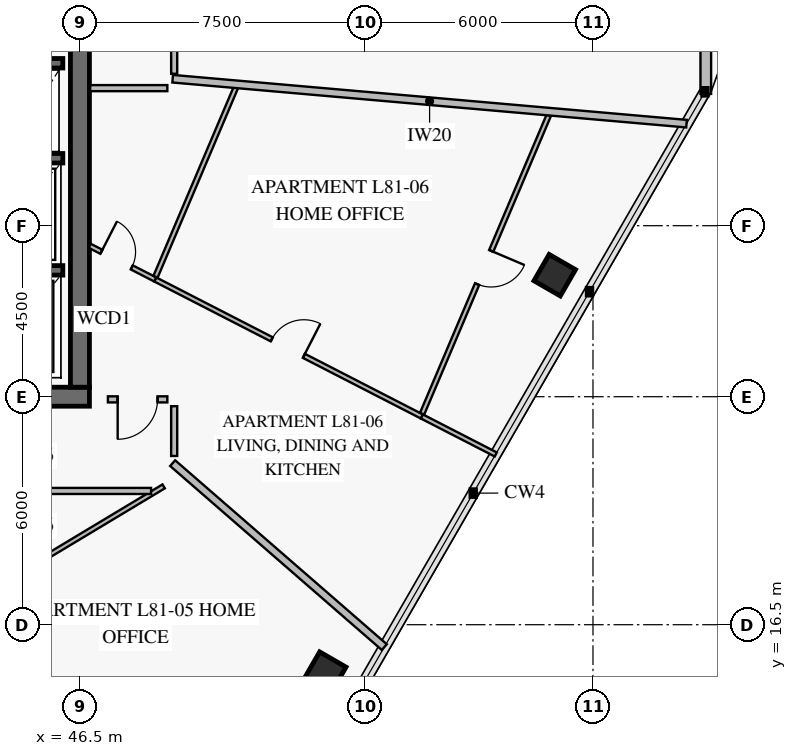
"""IFC4 building model, lengths in metres.
Left out: names, types, materials, properties, quantities, classifications, styles, units other than length and angle.
Written with IfcOpenShell. Run it as: python <this file> out.ifc"""

import sys

from ifc_helpers import new_model, si_unit, direction, frame, frame_2d, origin, origin_2d, place, context, subcontext, project, spatial, rectangle, extrude, element, fill, save


model = new_model("IFC4")
c1 = context("Model", 3, precision=1e-05, world=origin(), true_north=direction((0.0, 1.0)))
c2 = subcontext(c1, "Body", "Model", "MODEL_VIEW")
j1 = project(units=[si_unit("LENGTHUNIT", "METRE"), si_unit("PLANEANGLEUNIT", "RADIAN")], contexts=[c1])
p1 = place(None, origin())
s1 = spatial("IfcSite", under=j1, at=p1, CompositionType="ELEMENT")
p2 = place(p1, origin())
s2 = spatial("IfcBuilding", under=s1, at=p2, CompositionType="ELEMENT")
p3 = place(p2, frame((0.0, 0.0, 319.6)))
s3 = spatial("IfcBuildingStorey", under=s2, at=p3, CompositionType="ELEMENT", Elevation=319.6)
p4 = place(p3, frame((37.35, 22.5, 0.0), z_axis=(0.0, 0.0, 1.0), x_axis=(1.0, 0.0, 0.0)))
e1 = element("IfcWall", 1, at=p4, inside=s3, PredefinedType="SHEAR", context=c2, shape_type="SweptSolid", body=[
    extrude(rectangle(XDim=9.4, YDim=0.5, at=frame_2d((4.7, 0.0))), origin(), (0.0, 0.0, 1.0), 3.8),
])
p5 = place(p4, frame((3.95, 0.0, 0.0)))
e2 = element("IfcOpeningElement", 2, at=p5, cuts=e1, PredefinedType="OPENING", context=c2, shape_type="SweptSolid", body=[
    extrude(rectangle(XDim=1.5, YDim=2.15, at=frame_2d((0.75, 1.075))), frame((0.0, 0.262, 0.0), z_axis=(0.0, -1.0, 0.0), x_axis=(1.0, 0.0, 0.0)), (0.0, 0.0, 1.0), 0.524),
])
p6 = place(p3, frame((46.5, 22.75, 0.0), z_axis=(0.0, 0.0, 1.0), x_axis=(0.0, 1.0, 0.0)))
e3 = element("IfcWall", 3, at=p6, inside=s3, PredefinedType="SHEAR", context=c2, shape_type="SweptSolid", body=[
    extrude(rectangle(XDim=18.5, YDim=0.5, at=frame_2d((9.25, 0.0))), origin(), (0.0, 0.0, 1.0), 3.8),
])
p7 = place(p6, frame((9.0, 0.0, 0.0)))
e4 = element("IfcOpeningElement", 4, at=p7, cuts=e3, PredefinedType="OPENING", context=c2, shape_type="SweptSolid", body=[
    extrude(rectangle(XDim=1.1, YDim=2.15, at=frame_2d((0.55, 1.075))), frame((0.0, 0.262, 0.0), z_axis=(0.0, -1.0, 0.0), x_axis=(1.0, 0.0, 0.0)), (0.0, 0.0, 1.0), 0.524),
])
for number, where, z_axis, x_axis in (
    (5, (52.955, 15.238, 0.0), (0.0, 0.0, 1.0), (0.5, 0.866, 0.0)),
    (6, (58.993, 25.698, 0.0), (0.0, 0.0, 1.0), (0.5, 0.866, 0.0)),
):
    element("IfcColumn", number, at=place(p3, frame(where, z_axis=z_axis, x_axis=x_axis)), inside=s3, PredefinedType="COLUMN", context=c2, shape_type="SweptSolid", body=[
        extrude(rectangle(XDim=0.8, YDim=0.8, at=origin_2d()), origin(), (0.0, 0.0, 1.0), 3.55),
    ])
p8 = place(p3, frame((62.969, 33.532, 0.0), z_axis=(0.0, 0.0, 1.0), x_axis=(0.0, -1.0, 0.0)))
e7 = element("IfcWall", 7, at=p8, inside=s3, PredefinedType="SOLIDWALL", context=c2, shape_type="SweptSolid", body=[
    extrude(rectangle(XDim=3.065, YDim=0.28, at=frame_2d((1.532, 0.0))), origin(), (0.0, 0.0, 1.0), 3.55),
])
p9 = place(p3, frame((25.95, 31.275, 0.0), z_axis=(0.0, 0.0, 1.0), x_axis=(1.0, 0.0, 0.0)))
e8 = element("IfcWall", 8, at=p9, inside=s3, PredefinedType="SOLIDWALL", context=c2, shape_type="SweptSolid", body=[
    extrude(rectangle(XDim=20.1, YDim=0.25, at=frame_2d((10.05, 0.0))), origin(), (0.0, 0.0, 1.0), 3.8),
])
p10 = place(p9, frame((2.6, 0.0, 0.0)))
e9 = element("IfcOpeningElement", 9, at=p10, cuts=e8, PredefinedType="OPENING", context=c2, shape_type="SweptSolid", body=[
    extrude(rectangle(XDim=1.1, YDim=2.15, at=frame_2d((0.55, 1.075))), frame((0.0, 0.137, 0.0), z_axis=(0.0, -1.0, 0.0), x_axis=(1.0, 0.0, 0.0)), (0.0, 0.0, 1.0), 0.274),
])
p11 = place(p9, frame((10.6, 0.0, 0.0)))
e10 = element("IfcOpeningElement", 10, at=p11, cuts=e8, PredefinedType="OPENING", context=c2, shape_type="SweptSolid", body=[
    extrude(rectangle(XDim=1.1, YDim=2.15, at=frame_2d((0.55, 1.075))), frame((0.0, 0.137, 0.0), z_axis=(0.0, -1.0, 0.0), x_axis=(1.0, 0.0, 0.0)), (0.0, 0.0, 1.0), 0.274),
])
p12 = place(p9, frame((16.35, 0.0, 0.0)))
e11 = element("IfcOpeningElement", 11, at=p12, cuts=e8, PredefinedType="OPENING", context=c2, shape_type="SweptSolid", body=[
    extrude(rectangle(XDim=1.1, YDim=2.15, at=frame_2d((0.55, 1.075))), frame((0.0, 0.137, 0.0), z_axis=(0.0, -1.0, 0.0), x_axis=(1.0, 0.0, 0.0)), (0.0, 0.0, 1.0), 0.274),
])
for number, where, z_axis, x_axis in (
    (12, (43.8, 25.825, 0.0), (0.0, 0.0, 1.0), (1.0, 0.0, 0.0)),
    (13, (43.8, 28.775, 0.0), (0.0, 0.0, 1.0), (1.0, 0.0, 0.0)),
):
    element("IfcWall", number, at=place(p3, frame(where, z_axis=z_axis, x_axis=x_axis)), inside=s3, PredefinedType="SOLIDWALL", context=c2, shape_type="SweptSolid", body=[
        extrude(rectangle(XDim=2.25, YDim=0.25, at=frame_2d((1.125, 0.0))), origin(), (0.0, 0.0, 1.0), 3.8),
    ])
p13 = place(p3, frame((43.565, 17.023, 0.0), z_axis=(0.0, 0.0, 1.0), x_axis=(0.450887042269, -0.892581018796, 0.0)))
e14 = element("IfcWall", 14, at=p13, inside=s3, PredefinedType="PARTITIONING", context=c2, shape_type="SweptSolid", body=[
    extrude(rectangle(XDim=7.436, YDim=0.12, at=frame_2d((3.718, 0.0))), origin(), (0.0, 0.0, 1.0), 2.97),
])
p14 = place(p13, frame((3.218, 0.0, 0.0)))
e15 = element("IfcOpeningElement", 15, at=p14, cuts=e14, PredefinedType="OPENING", context=c2, shape_type="SweptSolid", body=[
    extrude(rectangle(XDim=0.95, YDim=2.1, at=frame_2d((0.475, 1.05))), frame((0.0, 0.072, 0.0), z_axis=(0.0, -1.0, 0.0), x_axis=(1.0, 0.0, 0.0)), (0.0, 0.0, 1.0), 0.144),
])
p15 = place(p3, frame((46.758, 26.471, 0.0), z_axis=(0.0, 0.0, 1.0), x_axis=(0.889392970677, -0.457143460755, 0.0)))
e16 = element("IfcWall", 16, at=p15, inside=s3, PredefinedType="PARTITIONING", context=c2, shape_type="SweptSolid", body=[
    extrude(rectangle(XDim=1.942, YDim=0.12, at=frame_2d((0.971, 0.0))), origin(), (0.0, 0.0, 1.0), 3.55),
])
p16 = place(p15, frame((0.344, 0.0, 0.0)))
e17 = element("IfcOpeningElement", 17, at=p16, cuts=e16, PredefinedType="OPENING", context=c2, shape_type="SweptSolid", body=[
    extrude(rectangle(XDim=0.9, YDim=2.1, at=frame_2d((0.45, 1.05))), frame((0.0, 0.072, 0.0), z_axis=(0.0, -1.0, 0.0), x_axis=(1.0, 0.0, 0.0)), (0.0, 0.0, 1.0), 0.144),
])
p17 = place(p3, frame((48.485, 25.583, 0.0), z_axis=(0.0, 0.0, 1.0), x_axis=(0.889425539597, -0.457080090917, 0.0)))
e18 = element("IfcWall", 18, at=p17, inside=s3, PredefinedType="PARTITIONING", context=c2, shape_type="SweptSolid", body=[
    extrude(rectangle(XDim=7.886, YDim=0.12, at=frame_2d((3.943, 0.0))), origin(), (0.0, 0.0, 1.0), 3.2),
])
p18 = place(p17, frame((3.443, 0.0, 0.0)))
e19 = element("IfcOpeningElement", 19, at=p18, cuts=e18, PredefinedType="OPENING", context=c2, shape_type="SweptSolid", body=[
    extrude(rectangle(XDim=0.95, YDim=2.1, at=frame_2d((0.475, 1.05))), frame((0.0, 0.072, 0.0), z_axis=(0.0, -1.0, 0.0), x_axis=(1.0, 0.0, 0.0)), (0.0, 0.0, 1.0), 0.144),
])
p19 = place(p3, frame((55.504, 22.053, 0.0), z_axis=(0.0, 0.0, 1.0), x_axis=(0.390730730801, 0.920505022261, 0.0)))
e20 = element("IfcWall", 20, at=p19, inside=s3, PredefinedType="PARTITIONING", context=c2, shape_type="SweptSolid", body=[
    extrude(rectangle(XDim=8.526, YDim=0.12, at=frame_2d((4.263, 0.0))), origin(), (0.0, 0.0, 1.0), 3.0),
])
p20 = place(p19, frame((3.704, 0.0, 0.0)))
e21 = element("IfcOpeningElement", 21, at=p20, cuts=e20, PredefinedType="OPENING", context=c2, shape_type="SweptSolid", body=[
    extrude(rectangle(XDim=0.95, YDim=2.1, at=frame_2d((0.475, 1.05))), frame((0.0, 0.072, 0.0), z_axis=(0.0, -1.0, 0.0), x_axis=(1.0, 0.0, 0.0)), (0.0, 0.0, 1.0), 0.144),
])
p21 = place(p3, frame((48.8, 22.43, 0.0), z_axis=(0.0, 0.0, 1.0), x_axis=(-1.0, 0.0, 0.0)))
e22 = element("IfcWall", 22, at=p21, inside=s3, PredefinedType="PARTITIONING", context=c2, shape_type="SweptSolid", body=[
    extrude(rectangle(XDim=1.564, YDim=0.16, at=frame_2d((0.782, 0.0))), origin(), (0.0, 0.0, 1.0), 3.55),
])
p22 = place(p21, frame((0.257, 0.0, 0.0)))
e23 = element("IfcOpeningElement", 23, at=p22, cuts=e22, PredefinedType="OPENING", context=c2, shape_type="SweptSolid", body=[
    extrude(rectangle(XDim=1.05, YDim=2.15, at=frame_2d((0.525, 1.075))), frame((0.0, 0.092, 0.0), z_axis=(0.0, -1.0, 0.0), x_axis=(1.0, 0.0, 0.0)), (0.0, 0.0, 1.0), 0.184),
])
p23 = place(p3, frame((48.98, 30.999, 0.0), z_axis=(0.0, 0.0, 1.0), x_axis=(0.0, 1.0, 0.0)))
e24 = element("IfcWall", 24, at=p23, inside=s3, PredefinedType="PARTITIONING", context=c2, shape_type="SweptSolid", body=[
    extrude(rectangle(XDim=3.163, YDim=0.16, at=frame_2d((1.581, 0.0))), origin(), (0.0, 0.0, 1.0), 3.55),
])
p24 = place(p23, frame((1.056, 0.0, 0.0)))
e25 = element("IfcOpeningElement", 25, at=p24, cuts=e24, PredefinedType="OPENING", context=c2, shape_type="SweptSolid", body=[
    extrude(rectangle(XDim=1.05, YDim=2.15, at=frame_2d((0.525, 1.075))), frame((0.0, 0.092, 0.0), z_axis=(0.0, -1.0, 0.0), x_axis=(1.0, 0.0, 0.0)), (0.0, 0.0, 1.0), 0.184),
])
p25 = place(p3, frame((43.612, 17.081, 0.0), z_axis=(0.0, 0.0, 1.0), x_axis=(0.857173603687, 0.515027584837, 0.0)))
e26 = element("IfcWall", 26, at=p25, inside=s3, PredefinedType="PARTITIONING", context=c2, shape_type="SweptSolid", body=[
    extrude(rectangle(XDim=5.94, YDim=0.12, at=frame_2d((2.97, 0.0))), origin(), (0.0, 0.0, 1.0), 3.0),
])
p26 = place(p3, frame((48.94, 20.751, 0.0), z_axis=(0.0, 0.0, 1.0), x_axis=(0.754714491072, -0.656053379662, 0.0)))
e27 = element("IfcWall", 27, at=p26, inside=s3, PredefinedType="PARTITIONING", context=c2, shape_type="SweptSolid", body=[
    extrude(rectangle(XDim=7.379, YDim=0.2, at=frame_2d((3.689, 0.0))), origin(), (0.0, 0.0, 1.0), 2.97),
])
p27 = place(p3, frame((55.5, 21.979, 0.0), z_axis=(0.0, 0.0, 1.0), x_axis=(0.889363131607, -0.457201509335, 0.0)))
e28 = element("IfcWall", 28, at=p27, inside=s3, PredefinedType="PARTITIONING", context=c2, shape_type="SweptSolid", body=[
    extrude(rectangle(XDim=2.184, YDim=0.12, at=frame_2d((1.092, 0.0))), origin(), (0.0, 0.0, 1.0), 2.97),
])
p28 = place(p3, frame((48.49, 25.658, 0.0), z_axis=(0.0, 0.0, 1.0), x_axis=(0.390765351484, 0.920490325902, 0.0)))
e29 = element("IfcWall", 29, at=p28, inside=s3, PredefinedType="PARTITIONING", context=c2, shape_type="SweptSolid", body=[
    extrude(rectangle(XDim=5.469, YDim=0.12, at=frame_2d((2.735, 0.0))), origin(), (0.0, 0.0, 1.0), 3.0),
])
p29 = place(p3, frame((48.94, 30.868, 0.0), z_axis=(0.0, 0.0, 1.0), x_axis=(0.996194010343, -0.087163603397, 0.0)))
e30 = element("IfcWall", 30, at=p29, inside=s3, PredefinedType="PARTITIONING", context=c2, shape_type="SweptSolid", body=[
    extrude(rectangle(XDim=13.573, YDim=0.2, at=frame_2d((6.787, 0.0))), origin(), (0.0, 0.0, 1.0), 2.97),
])
p30 = place(p3, frame((42.128, 20.02, 0.0), z_axis=(0.0, 0.0, 1.0), x_axis=(1.0, 0.0, 0.0)))
e31 = element("IfcWall", 31, at=p30, inside=s3, PredefinedType="PARTITIONING", context=c2, shape_type="SweptSolid", body=[
    extrude(rectangle(XDim=6.244, YDim=0.16, at=frame_2d((3.122, 0.0))), origin(), (0.0, 0.0, 1.0), 3.0),
])
p31 = place(p3, frame((48.98, 20.94, 0.0), z_axis=(0.0, 0.0, 1.0), x_axis=(0.0, 1.0, 0.0)))
e32 = element("IfcWall", 32, at=p31, inside=s3, PredefinedType="PARTITIONING", context=c2, shape_type="SweptSolid", body=[
    extrude(rectangle(XDim=1.31, YDim=0.16, at=frame_2d((0.655, 0.0))), origin(), (0.0, 0.0, 1.0), 3.55),
])
p32 = place(p3, frame((46.77, 30.62, 0.0), z_axis=(0.0, 0.0, 1.0), x_axis=(1.0, 0.0, 0.0)))
e33 = element("IfcWall", 33, at=p32, inside=s3, PredefinedType="PARTITIONING", context=c2, shape_type="SweptSolid", body=[
    extrude(rectangle(XDim=2.03, YDim=0.16, at=frame_2d((1.015, 0.0))), origin(), (0.0, 0.0, 1.0), 3.55),
])
p33 = place(p16, origin())
e34 = element("IfcDoor", 34, at=p33, inside=s3, OperationType="SINGLE_SWING_LEFT", PredefinedType="DOOR", context=c2, shape_type="SweptSolid", body=[
    extrude(rectangle(XDim=0.9, YDim=2.1, at=frame_2d((0.45, 1.05))), frame((0.0, 0.025, 0.0), z_axis=(0.0, -1.0, 0.0), x_axis=(1.0, 0.0, 0.0)), (0.0, 0.0, 1.0), 0.05),
])
fill(e17, e34)
p34 = place(p18, origin())
e35 = element("IfcDoor", 35, at=p34, inside=s3, OperationType="SINGLE_SWING_RIGHT", PredefinedType="DOOR", context=c2, shape_type="SweptSolid", body=[
    extrude(rectangle(XDim=0.95, YDim=2.1, at=frame_2d((0.475, 1.05))), frame((0.0, 0.025, 0.0), z_axis=(0.0, -1.0, 0.0), x_axis=(1.0, 0.0, 0.0)), (0.0, 0.0, 1.0), 0.05),
])
fill(e19, e35)
p35 = place(p20, frame((0.95, 0.0, 0.0), z_axis=(0.0, 0.0, 1.0), x_axis=(-1.0, 0.0, 0.0)))
e36 = element("IfcDoor", 36, at=p35, inside=s3, OperationType="SINGLE_SWING_LEFT", PredefinedType="DOOR", context=c2, shape_type="SweptSolid", body=[
    extrude(rectangle(XDim=0.95, YDim=2.1, at=frame_2d((0.475, 1.05))), frame((0.0, 0.025, 0.0), z_axis=(0.0, -1.0, 0.0), x_axis=(1.0, 0.0, 0.0)), (0.0, 0.0, 1.0), 0.05),
])
fill(e21, e36)
p36 = place(p22, origin())
e37 = element("IfcDoor", 37, at=p36, inside=s3, OperationType="SINGLE_SWING_RIGHT", PredefinedType="DOOR", context=c2, shape_type="SweptSolid", body=[
    extrude(rectangle(XDim=1.05, YDim=2.15, at=frame_2d((0.525, 1.075))), frame((0.0, 0.025, 0.0), z_axis=(0.0, -1.0, 0.0), x_axis=(1.0, 0.0, 0.0)), (0.0, 0.0, 1.0), 0.05),
])
fill(e23, e37)
save(model, sys.argv[1])
